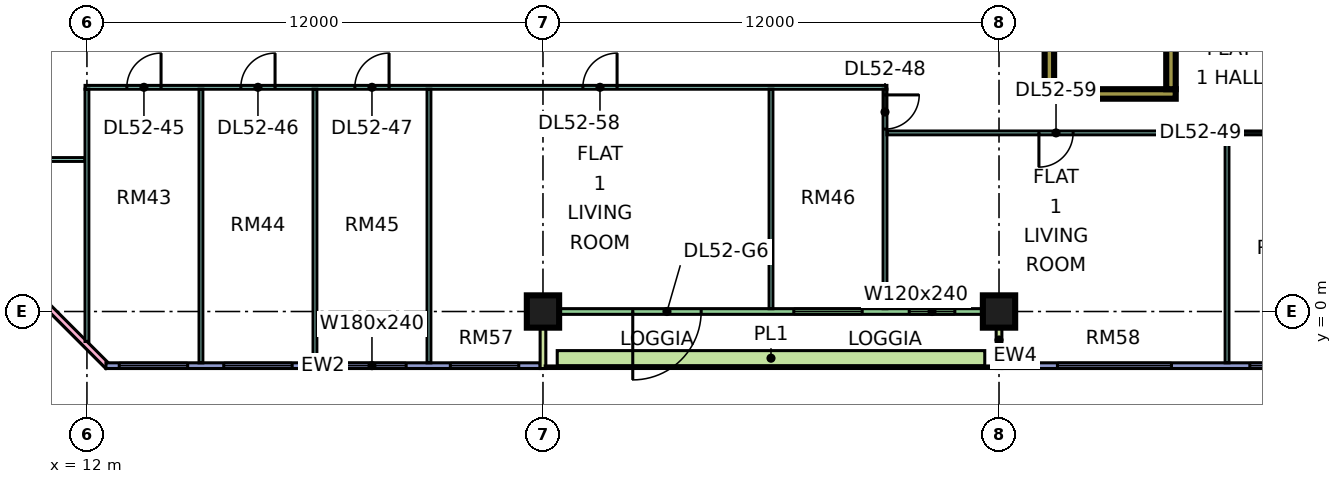
"""IFC4 building model, lengths in metres.
Left out: names, types, materials, properties, quantities, classifications, styles, units other than length and angle.
Written with IfcOpenShell. Run it as: python <this file> out.ifc"""

import sys

from ifc_helpers import new_model, si_unit, direction, frame, frame_2d, origin, origin_2d, place, context, subcontext, project, spatial, rectangle, extrude, element, fill, save


model = new_model("IFC4")
c1 = context("Model", 3, precision=1e-05, world=origin(), true_north=direction((0.0, 1.0)))
c2 = subcontext(c1, "Body", "Model", "MODEL_VIEW")
j1 = project(units=[si_unit("LENGTHUNIT", "METRE"), si_unit("PLANEANGLEUNIT", "RADIAN")], contexts=[c1])
p1 = place(None, origin())
s1 = spatial("IfcSite", under=j1, at=p1, CompositionType="ELEMENT")
p2 = place(p1, origin())
s2 = spatial("IfcBuilding", under=s1, at=p2, CompositionType="ELEMENT")
p3 = place(p2, frame((0.0, 0.0, 222.9)))
s3 = spatial("IfcBuildingStorey", under=s2, at=p3, CompositionType="ELEMENT", Elevation=222.9)
for number, where, z_axis, x_axis in (
    (1, (24.0, 0.0, 0.0), (0.0, 0.0, 1.0), (1.0, 0.0, 0.0)),
    (2, (36.0, 0.0, 0.0), (0.0, 0.0, 1.0), (1.0, 0.0, 0.0)),
):
    element("IfcColumn", number, at=place(p3, frame(where, z_axis=z_axis, x_axis=x_axis)), inside=s3, PredefinedType="COLUMN", context=c2, shape_type="SweptSolid", body=[
        extrude(rectangle(XDim=0.85, YDim=0.85, at=origin_2d()), origin(), (0.0, 0.0, 1.0), 3.75),
    ])
p4 = place(p3, frame((37.2, 5.725, 0.0), z_axis=(0.0, 0.0, 1.0), x_axis=(1.0, 0.0, 0.0)))
e3 = element("IfcWall", 3, at=p4, inside=s3, PredefinedType="SHEAR", context=c2, shape_type="SweptSolid", body=[
    extrude(rectangle(XDim=3.45, YDim=0.25, at=frame_2d((1.725, 0.0))), origin(), (0.0, 0.0, 1.0), 3.75),
])
for number, where, z_axis, x_axis in (
    (4, (37.325, 5.85, 0.0), (0.0, 0.0, 1.0), (0.0, 1.0, 0.0)),
    (5, (40.525, 5.85, 0.0), (0.0, 0.0, 1.0), (0.0, 1.0, 0.0)),
):
    element("IfcWall", number, at=place(p3, frame(where, z_axis=z_axis, x_axis=x_axis)), inside=s3, PredefinedType="SHEAR", context=c2, shape_type="SweptSolid", body=[
        extrude(rectangle(XDim=6.5, YDim=0.25, at=frame_2d((3.25, 0.0))), origin(), (0.0, 0.0, 1.0), 3.75),
    ])
p5 = place(p3, frame((-1.447, 12.553, 0.0), z_axis=(0.0, 0.0, 1.0), x_axis=(0.707106781187, -0.707106781187, 0.0)))
e6 = element("IfcWall", 6, at=p5, inside=s3, PredefinedType="SOLIDWALL", context=c2, shape_type="SweptSolid", body=[
    extrude(rectangle(XDim=19.799, YDim=0.15, at=frame_2d((9.899, 0.0))), origin(), (0.0, 0.0, 1.0), 3.35),
])
p6 = place(p5, frame((2.212, 0.0, 0.45)))
e7 = element("IfcOpeningElement", 7, at=p6, cuts=e6, PredefinedType="OPENING", context=c2, shape_type="SweptSolid", body=[
    extrude(rectangle(XDim=3.0, YDim=2.4, at=frame_2d((1.5, 1.2))), frame((0.0, 0.085, 0.0), z_axis=(0.0, -1.0, 0.0), x_axis=(1.0, 0.0, 0.0)), (0.0, 0.0, 1.0), 0.17),
])
p7 = place(p5, frame((10.216, 0.0, 0.45)))
e8 = element("IfcOpeningElement", 8, at=p7, cuts=e6, PredefinedType="OPENING", context=c2, shape_type="SweptSolid", body=[
    extrude(rectangle(XDim=3.0, YDim=2.4, at=frame_2d((1.5, 1.2))), frame((0.0, 0.085, 0.0), z_axis=(0.0, -1.0, 0.0), x_axis=(1.0, 0.0, 0.0)), (0.0, 0.0, 1.0), 0.17),
])
p8 = place(p3, frame((12.5, -1.425, 0.0), z_axis=(0.0, 0.0, 1.0), x_axis=(1.0, 0.0, 0.0)))
e9 = element("IfcWall", 9, at=p8, inside=s3, PredefinedType="SOLIDWALL", context=c2, shape_type="SweptSolid", body=[
    extrude(rectangle(XDim=11.425, YDim=0.15, at=frame_2d((5.712, 0.0))), origin(), (0.0, 0.0, 1.0), 3.35),
])
p9 = place(p8, frame((0.35, 0.0, 0.45)))
e10 = element("IfcOpeningElement", 10, at=p9, cuts=e9, PredefinedType="OPENING", context=c2, shape_type="SweptSolid", body=[
    extrude(rectangle(XDim=1.8, YDim=2.4, at=frame_2d((0.9, 1.2))), frame((0.0, 0.085, 0.0), z_axis=(0.0, -1.0, 0.0), x_axis=(1.0, 0.0, 0.0)), (0.0, 0.0, 1.0), 0.17),
])
p10 = place(p8, frame((3.1, 0.0, 0.45)))
e11 = element("IfcOpeningElement", 11, at=p10, cuts=e9, PredefinedType="OPENING", context=c2, shape_type="SweptSolid", body=[
    extrude(rectangle(XDim=1.8, YDim=2.4, at=frame_2d((0.9, 1.2))), frame((0.0, 0.085, 0.0), z_axis=(0.0, -1.0, 0.0), x_axis=(1.0, 0.0, 0.0)), (0.0, 0.0, 1.0), 0.17),
])
p11 = place(p8, frame((6.1, 0.0, 0.45)))
e12 = element("IfcOpeningElement", 12, at=p11, cuts=e9, PredefinedType="OPENING", context=c2, shape_type="SweptSolid", body=[
    extrude(rectangle(XDim=1.8, YDim=2.4, at=frame_2d((0.9, 1.2))), frame((0.0, 0.085, 0.0), z_axis=(0.0, -1.0, 0.0), x_axis=(1.0, 0.0, 0.0)), (0.0, 0.0, 1.0), 0.17),
])
p12 = place(p8, frame((9.062, 0.0, 0.45)))
e13 = element("IfcOpeningElement", 13, at=p12, cuts=e9, PredefinedType="OPENING", context=c2, shape_type="SweptSolid", body=[
    extrude(rectangle(XDim=1.8, YDim=2.4, at=frame_2d((0.9, 1.2))), frame((0.0, 0.085, 0.0), z_axis=(0.0, -1.0, 0.0), x_axis=(1.0, 0.0, 0.0)), (0.0, 0.0, 1.0), 0.17),
])
p13 = place(p3, frame((24.075, 0.0, 0.0), z_axis=(0.0, 0.0, 1.0), x_axis=(1.0, 0.0, 0.0)))
e14 = element("IfcWall", 14, at=p13, inside=s3, PredefinedType="SOLIDWALL", context=c2, shape_type="SweptSolid", body=[
    extrude(rectangle(XDim=11.85, YDim=0.15, at=frame_2d((5.925, 0.0))), origin(), (0.0, 0.0, 1.0), 3.35),
])
p14 = place(p13, frame((2.288, 0.0, 0.0)))
e15 = element("IfcOpeningElement", 15, at=p14, cuts=e14, PredefinedType="OPENING", context=c2, shape_type="SweptSolid", body=[
    extrude(rectangle(XDim=1.8, YDim=2.4, at=frame_2d((0.9, 1.2))), frame((0.0, 0.085, 0.0), z_axis=(0.0, -1.0, 0.0), x_axis=(1.0, 0.0, 0.0)), (0.0, 0.0, 1.0), 0.17),
])
p15 = place(p13, frame((6.525, 0.0, 0.45)))
e16 = element("IfcOpeningElement", 16, at=p15, cuts=e14, PredefinedType="OPENING", context=c2, shape_type="SweptSolid", body=[
    extrude(rectangle(XDim=1.8, YDim=2.4, at=frame_2d((0.9, 1.2))), frame((0.0, 0.085, 0.0), z_axis=(0.0, -1.0, 0.0), x_axis=(1.0, 0.0, 0.0)), (0.0, 0.0, 1.0), 0.17),
])
p16 = place(p13, frame((9.562, 0.0, 0.45)))
e17 = element("IfcOpeningElement", 17, at=p16, cuts=e14, PredefinedType="OPENING", context=c2, shape_type="SweptSolid", body=[
    extrude(rectangle(XDim=1.2, YDim=2.4, at=frame_2d((0.6, 1.2))), frame((0.0, 0.085, 0.0), z_axis=(0.0, -1.0, 0.0), x_axis=(1.0, 0.0, 0.0)), (0.0, 0.0, 1.0), 0.17),
])
for number, where, z_axis, x_axis in (
    (18, (24.0, -1.5, 0.0), (0.0, 0.0, 1.0), (0.0, 1.0, 0.0)),
    (19, (36.0, -1.5, 0.0), (0.0, 0.0, 1.0), (0.0, 1.0, 0.0)),
):
    element("IfcWall", number, at=place(p3, frame(where, z_axis=z_axis, x_axis=x_axis)), inside=s3, PredefinedType="SOLIDWALL", context=c2, shape_type="SweptSolid", body=[
        extrude(rectangle(XDim=1.5, YDim=0.15, at=frame_2d((0.75, 0.0))), origin(), (0.0, 0.0, 1.0), 3.35),
    ])
p17 = place(p3, frame((36.075, -1.425, 0.0), z_axis=(0.0, 0.0, 1.0), x_axis=(1.0, 0.0, 0.0)))
e20 = element("IfcWall", 20, at=p17, inside=s3, PredefinedType="SOLIDWALL", context=c2, shape_type="SweptSolid", body=[
    extrude(rectangle(XDim=11.85, YDim=0.15, at=frame_2d((5.925, 0.0))), origin(), (0.0, 0.0, 1.0), 3.35),
])
p18 = place(p17, frame((1.462, 0.0, 0.45)))
e21 = element("IfcOpeningElement", 21, at=p18, cuts=e20, PredefinedType="OPENING", context=c2, shape_type="SweptSolid", body=[
    extrude(rectangle(XDim=3.0, YDim=2.4, at=frame_2d((1.5, 1.2))), frame((0.0, 0.085, 0.0), z_axis=(0.0, -1.0, 0.0), x_axis=(1.0, 0.0, 0.0)), (0.0, 0.0, 1.0), 0.17),
])
p19 = place(p17, frame((6.525, 0.0, 0.45)))
e22 = element("IfcOpeningElement", 22, at=p19, cuts=e20, PredefinedType="OPENING", context=c2, shape_type="SweptSolid", body=[
    extrude(rectangle(XDim=1.8, YDim=2.4, at=frame_2d((0.9, 1.2))), frame((0.0, 0.085, 0.0), z_axis=(0.0, -1.0, 0.0), x_axis=(1.0, 0.0, 0.0)), (0.0, 0.0, 1.0), 0.17),
])
p20 = place(p17, frame((9.488, 0.0, 0.45)))
e23 = element("IfcOpeningElement", 23, at=p20, cuts=e20, PredefinedType="OPENING", context=c2, shape_type="SweptSolid", body=[
    extrude(rectangle(XDim=1.8, YDim=2.4, at=frame_2d((0.9, 1.2))), frame((0.0, 0.085, 0.0), z_axis=(0.0, -1.0, 0.0), x_axis=(1.0, 0.0, 0.0)), (0.0, 0.0, 1.0), 0.17),
])
p21 = place(p3, frame((24.375, -1.229, 0.0), z_axis=(0.0, 0.0, 1.0), x_axis=(1.0, 0.0, 0.0)))
e24 = element("IfcWall", 24, at=p21, inside=s3, PredefinedType="SOLIDWALL", context=c2, shape_type="SweptSolid", body=[
    extrude(rectangle(XDim=11.25, YDim=0.4, at=frame_2d((5.625, 0.0))), origin(), (0.0, 0.0, 1.0), 0.7),
])
p22 = place(p3, frame((9.05, 4.0, 0.0), z_axis=(0.0, 0.0, 1.0), x_axis=(1.0, 0.0, 0.0)))
e25 = element("IfcWall", 25, at=p22, inside=s3, PredefinedType="PARTITIONING", context=c2, shape_type="SweptSolid", body=[
    extrude(rectangle(XDim=2.9, YDim=0.1, at=frame_2d((1.45, 0.0))), origin(), (0.0, 0.0, 1.0), 3.35),
])
p23 = place(p3, frame((11.95, 5.9, 0.0), z_axis=(0.0, 0.0, 1.0), x_axis=(1.0, 0.0, 0.0)))
e26 = element("IfcWall", 26, at=p23, inside=s3, PredefinedType="PARTITIONING", context=c2, shape_type="SweptSolid", body=[
    extrude(rectangle(XDim=21.1, YDim=0.1, at=frame_2d((10.55, 0.0))), origin(), (0.0, 0.0, 1.0), 3.35),
])
p24 = place(p23, frame((1.1, 0.0, 0.0)))
e27 = element("IfcOpeningElement", 27, at=p24, cuts=e26, PredefinedType="OPENING", context=c2, shape_type="SweptSolid", body=[
    extrude(rectangle(XDim=0.9, YDim=2.1, at=frame_2d((0.45, 1.05))), frame((0.0, 0.06, 0.0), z_axis=(0.0, -1.0, 0.0), x_axis=(1.0, 0.0, 0.0)), (0.0, 0.0, 1.0), 0.12),
])
p25 = place(p23, frame((4.1, 0.0, 0.0)))
e28 = element("IfcOpeningElement", 28, at=p25, cuts=e26, PredefinedType="OPENING", context=c2, shape_type="SweptSolid", body=[
    extrude(rectangle(XDim=0.9, YDim=2.1, at=frame_2d((0.45, 1.05))), frame((0.0, 0.06, 0.0), z_axis=(0.0, -1.0, 0.0), x_axis=(1.0, 0.0, 0.0)), (0.0, 0.0, 1.0), 0.12),
])
p26 = place(p23, frame((7.1, 0.0, 0.0)))
e29 = element("IfcOpeningElement", 29, at=p26, cuts=e26, PredefinedType="OPENING", context=c2, shape_type="SweptSolid", body=[
    extrude(rectangle(XDim=0.9, YDim=2.1, at=frame_2d((0.45, 1.05))), frame((0.0, 0.06, 0.0), z_axis=(0.0, -1.0, 0.0), x_axis=(1.0, 0.0, 0.0)), (0.0, 0.0, 1.0), 0.12),
])
p27 = place(p23, frame((13.1, 0.0, 0.0)))
e30 = element("IfcOpeningElement", 30, at=p27, cuts=e26, PredefinedType="OPENING", context=c2, shape_type="SweptSolid", body=[
    extrude(rectangle(XDim=0.9, YDim=2.1, at=frame_2d((0.45, 1.05))), frame((0.0, 0.06, 0.0), z_axis=(0.0, -1.0, 0.0), x_axis=(1.0, 0.0, 0.0)), (0.0, 0.0, 1.0), 0.12),
])
p28 = place(p3, frame((12.0, -0.788, 0.0), z_axis=(0.0, 0.0, 1.0), x_axis=(0.0, 1.0, 0.0)))
e31 = element("IfcWall", 31, at=p28, inside=s3, PredefinedType="PARTITIONING", context=c2, shape_type="SweptSolid", body=[
    extrude(rectangle(XDim=6.638, YDim=0.1, at=frame_2d((3.319, 0.0))), origin(), (0.0, 0.0, 1.0), 3.35),
])
for number, where, z_axis, x_axis in (
    (32, (15.0, -1.351, 0.0), (0.0, 0.0, 1.0), (0.0, 1.0, 0.0)),
    (33, (18.0, -1.351, 0.0), (0.0, 0.0, 1.0), (0.0, 1.0, 0.0)),
):
    element("IfcWall", number, at=place(p3, frame(where, z_axis=z_axis, x_axis=x_axis)), inside=s3, PredefinedType="PARTITIONING", context=c2, shape_type="SweptSolid", body=[
        extrude(rectangle(XDim=7.201, YDim=0.1, at=frame_2d((3.601, 0.0))), origin(), (0.0, 0.0, 1.0), 3.35),
    ])
p29 = place(p3, frame((21.0, -1.35, 0.0), z_axis=(0.0, 0.0, 1.0), x_axis=(0.0, 1.0, 0.0)))
e34 = element("IfcWall", 34, at=p29, inside=s3, PredefinedType="PARTITIONING", context=c2, shape_type="SweptSolid", body=[
    extrude(rectangle(XDim=7.2, YDim=0.1, at=frame_2d((3.6, 0.0))), origin(), (0.0, 0.0, 1.0), 3.35),
])
p30 = place(p3, frame((30.0, 0.074, 0.0), z_axis=(0.0, 0.0, 1.0), x_axis=(0.0, 1.0, 0.0)))
e35 = element("IfcWall", 35, at=p30, inside=s3, PredefinedType="PARTITIONING", context=c2, shape_type="SweptSolid", body=[
    extrude(rectangle(XDim=5.776, YDim=0.1, at=frame_2d((2.888, 0.0))), origin(), (0.0, 0.0, 1.0), 3.35),
])
p31 = place(p3, frame((33.0, 0.074, 0.0), z_axis=(0.0, 0.0, 1.0), x_axis=(0.0, 1.0, 0.0)))
e36 = element("IfcWall", 36, at=p31, inside=s3, PredefinedType="PARTITIONING", context=c2, shape_type="SweptSolid", body=[
    extrude(rectangle(XDim=5.776, YDim=0.1, at=frame_2d((2.888, 0.0))), origin(), (0.0, 0.0, 1.0), 3.35),
])
p32 = place(p31, frame((4.726, 0.0, 0.0)))
e37 = element("IfcOpeningElement", 37, at=p32, cuts=e36, PredefinedType="OPENING", context=c2, shape_type="SweptSolid", body=[
    extrude(rectangle(XDim=0.9, YDim=2.1, at=frame_2d((0.45, 1.05))), frame((0.0, 0.06, 0.0), z_axis=(0.0, -1.0, 0.0), x_axis=(1.0, 0.0, 0.0)), (0.0, 0.0, 1.0), 0.12),
])
p33 = place(p3, frame((33.05, 4.7, 0.0), z_axis=(0.0, 0.0, 1.0), x_axis=(1.0, 0.0, 0.0)))
e38 = element("IfcWall", 38, at=p33, inside=s3, PredefinedType="PARTITIONING", context=c2, shape_type="SweptSolid", body=[
    extrude(rectangle(XDim=20.85, YDim=0.1, at=frame_2d((10.425, 0.0))), origin(), (0.0, 0.0, 1.0), 3.35),
])
p34 = place(p33, frame((10.0, 0.0, 0.0)))
e39 = element("IfcOpeningElement", 39, at=p34, cuts=e38, PredefinedType="OPENING", context=c2, shape_type="SweptSolid", body=[
    extrude(rectangle(XDim=0.9, YDim=2.1, at=frame_2d((0.45, 1.05))), frame((0.0, 0.06, 0.0), z_axis=(0.0, -1.0, 0.0), x_axis=(1.0, 0.0, 0.0)), (0.0, 0.0, 1.0), 0.12),
])
p35 = place(p33, frame((13.0, 0.0, 0.0)))
e40 = element("IfcOpeningElement", 40, at=p35, cuts=e38, PredefinedType="OPENING", context=c2, shape_type="SweptSolid", body=[
    extrude(rectangle(XDim=0.9, YDim=2.1, at=frame_2d((0.45, 1.05))), frame((0.0, 0.06, 0.0), z_axis=(0.0, -1.0, 0.0), x_axis=(1.0, 0.0, 0.0)), (0.0, 0.0, 1.0), 0.12),
])
p36 = place(p33, frame((16.0, 0.0, 0.0)))
e41 = element("IfcOpeningElement", 41, at=p36, cuts=e38, PredefinedType="OPENING", context=c2, shape_type="SweptSolid", body=[
    extrude(rectangle(XDim=0.9, YDim=2.1, at=frame_2d((0.45, 1.05))), frame((0.0, 0.06, 0.0), z_axis=(0.0, -1.0, 0.0), x_axis=(1.0, 0.0, 0.0)), (0.0, 0.0, 1.0), 0.12),
])
p37 = place(p33, frame((19.0, 0.0, 0.0)))
e42 = element("IfcOpeningElement", 42, at=p37, cuts=e38, PredefinedType="OPENING", context=c2, shape_type="SweptSolid", body=[
    extrude(rectangle(XDim=0.9, YDim=2.1, at=frame_2d((0.45, 1.05))), frame((0.0, 0.06, 0.0), z_axis=(0.0, -1.0, 0.0), x_axis=(1.0, 0.0, 0.0)), (0.0, 0.0, 1.0), 0.12),
])
p38 = place(p33, frame((4.0, 0.0, 0.0)))
e43 = element("IfcOpeningElement", 43, at=p38, cuts=e38, PredefinedType="OPENING", context=c2, shape_type="SweptSolid", body=[
    extrude(rectangle(XDim=0.9, YDim=2.1, at=frame_2d((0.45, 1.05))), frame((0.0, 0.06, 0.0), z_axis=(0.0, -1.0, 0.0), x_axis=(1.0, 0.0, 0.0)), (0.0, 0.0, 1.0), 0.12),
])
p39 = place(p3, frame((42.0, -1.35, 0.0), z_axis=(0.0, 0.0, 1.0), x_axis=(0.0, 1.0, 0.0)))
e44 = element("IfcWall", 44, at=p39, inside=s3, PredefinedType="PARTITIONING", context=c2, shape_type="SweptSolid", body=[
    extrude(rectangle(XDim=6.0, YDim=0.1, at=frame_2d((3.0, 0.0))), origin(), (0.0, 0.0, 1.0), 3.35),
])
p40 = place(p9, origin())
e45 = element("IfcWindow", 45, at=p40, inside=s3, PartitioningType="SINGLE_PANEL", PredefinedType="WINDOW", context=c2, shape_type="SweptSolid", body=[
    extrude(rectangle(XDim=1.8, YDim=2.4, at=frame_2d((0.9, 1.2))), frame((0.0, 0.03, 0.0), z_axis=(0.0, -1.0, 0.0), x_axis=(1.0, 0.0, 0.0)), (0.0, 0.0, 1.0), 0.06),
])
fill(e10, e45)
p41 = place(p10, origin())
e46 = element("IfcWindow", 46, at=p41, inside=s3, PartitioningType="SINGLE_PANEL", PredefinedType="WINDOW", context=c2, shape_type="SweptSolid", body=[
    extrude(rectangle(XDim=1.8, YDim=2.4, at=frame_2d((0.9, 1.2))), frame((0.0, 0.03, 0.0), z_axis=(0.0, -1.0, 0.0), x_axis=(1.0, 0.0, 0.0)), (0.0, 0.0, 1.0), 0.06),
])
fill(e11, e46)
p42 = place(p11, origin())
e47 = element("IfcWindow", 47, at=p42, inside=s3, PartitioningType="SINGLE_PANEL", PredefinedType="WINDOW", context=c2, shape_type="SweptSolid", body=[
    extrude(rectangle(XDim=1.8, YDim=2.4, at=frame_2d((0.9, 1.2))), frame((0.0, 0.03, 0.0), z_axis=(0.0, -1.0, 0.0), x_axis=(1.0, 0.0, 0.0)), (0.0, 0.0, 1.0), 0.06),
])
fill(e12, e47)
p43 = place(p12, origin())
e48 = element("IfcWindow", 48, at=p43, inside=s3, PartitioningType="SINGLE_PANEL", PredefinedType="WINDOW", context=c2, shape_type="SweptSolid", body=[
    extrude(rectangle(XDim=1.8, YDim=2.4, at=frame_2d((0.9, 1.2))), frame((0.0, 0.03, 0.0), z_axis=(0.0, -1.0, 0.0), x_axis=(1.0, 0.0, 0.0)), (0.0, 0.0, 1.0), 0.06),
])
fill(e13, e48)
p44 = place(p14, frame((1.8, 0.0, 0.0), z_axis=(0.0, 0.0, 1.0), x_axis=(-1.0, 0.0, 0.0)))
e49 = element("IfcDoor", 49, at=p44, inside=s3, OperationType="DOUBLE_DOOR_SINGLE_SWING", PredefinedType="DOOR", context=c2, shape_type="SweptSolid", body=[
    extrude(rectangle(XDim=1.8, YDim=2.4, at=frame_2d((0.9, 1.2))), frame((0.0, 0.025, 0.0), z_axis=(0.0, -1.0, 0.0), x_axis=(1.0, 0.0, 0.0)), (0.0, 0.0, 1.0), 0.05),
])
fill(e15, e49)
p45 = place(p15, origin())
e50 = element("IfcWindow", 50, at=p45, inside=s3, PartitioningType="SINGLE_PANEL", PredefinedType="WINDOW", context=c2, shape_type="SweptSolid", body=[
    extrude(rectangle(XDim=1.8, YDim=2.4, at=frame_2d((0.9, 1.2))), frame((0.0, 0.03, 0.0), z_axis=(0.0, -1.0, 0.0), x_axis=(1.0, 0.0, 0.0)), (0.0, 0.0, 1.0), 0.06),
])
fill(e16, e50)
p46 = place(p16, origin())
e51 = element("IfcWindow", 51, at=p46, inside=s3, PartitioningType="SINGLE_PANEL", PredefinedType="WINDOW", context=c2, shape_type="SweptSolid", body=[
    extrude(rectangle(XDim=1.2, YDim=2.4, at=frame_2d((0.6, 1.2))), frame((0.0, 0.03, 0.0), z_axis=(0.0, -1.0, 0.0), x_axis=(1.0, 0.0, 0.0)), (0.0, 0.0, 1.0), 0.06),
])
fill(e17, e51)
p47 = place(p18, origin())
e52 = element("IfcWindow", 52, at=p47, inside=s3, PartitioningType="SINGLE_PANEL", PredefinedType="WINDOW", context=c2, shape_type="SweptSolid", body=[
    extrude(rectangle(XDim=3.0, YDim=2.4, at=frame_2d((1.5, 1.2))), frame((0.0, 0.03, 0.0), z_axis=(0.0, -1.0, 0.0), x_axis=(1.0, 0.0, 0.0)), (0.0, 0.0, 1.0), 0.06),
])
fill(e21, e52)
p48 = place(p19, origin())
e53 = element("IfcWindow", 53, at=p48, inside=s3, PartitioningType="SINGLE_PANEL", PredefinedType="WINDOW", context=c2, shape_type="SweptSolid", body=[
    extrude(rectangle(XDim=1.8, YDim=2.4, at=frame_2d((0.9, 1.2))), frame((0.0, 0.03, 0.0), z_axis=(0.0, -1.0, 0.0), x_axis=(1.0, 0.0, 0.0)), (0.0, 0.0, 1.0), 0.06),
])
fill(e22, e53)
p49 = place(p24, frame((0.9, 0.0, 0.0), z_axis=(0.0, 0.0, 1.0), x_axis=(-1.0, 0.0, 0.0)))
e54 = element("IfcDoor", 54, at=p49, inside=s3, OperationType="SINGLE_SWING_RIGHT", PredefinedType="DOOR", context=c2, shape_type="SweptSolid", body=[
    extrude(rectangle(XDim=0.9, YDim=2.1, at=frame_2d((0.45, 1.05))), frame((0.0, 0.025, 0.0), z_axis=(0.0, -1.0, 0.0), x_axis=(1.0, 0.0, 0.0)), (0.0, 0.0, 1.0), 0.05),
])
fill(e27, e54)
p50 = place(p25, frame((0.9, 0.0, 0.0), z_axis=(0.0, 0.0, 1.0), x_axis=(-1.0, 0.0, 0.0)))
e55 = element("IfcDoor", 55, at=p50, inside=s3, OperationType="SINGLE_SWING_RIGHT", PredefinedType="DOOR", context=c2, shape_type="SweptSolid", body=[
    extrude(rectangle(XDim=0.9, YDim=2.1, at=frame_2d((0.45, 1.05))), frame((0.0, 0.025, 0.0), z_axis=(0.0, -1.0, 0.0), x_axis=(1.0, 0.0, 0.0)), (0.0, 0.0, 1.0), 0.05),
])
fill(e28, e55)
p51 = place(p26, frame((0.9, 0.0, 0.0), z_axis=(0.0, 0.0, 1.0), x_axis=(-1.0, 0.0, 0.0)))
e56 = element("IfcDoor", 56, at=p51, inside=s3, OperationType="SINGLE_SWING_RIGHT", PredefinedType="DOOR", context=c2, shape_type="SweptSolid", body=[
    extrude(rectangle(XDim=0.9, YDim=2.1, at=frame_2d((0.45, 1.05))), frame((0.0, 0.025, 0.0), z_axis=(0.0, -1.0, 0.0), x_axis=(1.0, 0.0, 0.0)), (0.0, 0.0, 1.0), 0.05),
])
fill(e29, e56)
p52 = place(p32, origin())
e57 = element("IfcDoor", 57, at=p52, inside=s3, OperationType="SINGLE_SWING_RIGHT", PredefinedType="DOOR", context=c2, shape_type="SweptSolid", body=[
    extrude(rectangle(XDim=0.9, YDim=2.1, at=frame_2d((0.45, 1.05))), frame((0.0, 0.025, 0.0), z_axis=(0.0, -1.0, 0.0), x_axis=(1.0, 0.0, 0.0)), (0.0, 0.0, 1.0), 0.05),
])
fill(e37, e57)
p53 = place(p27, frame((0.9, 0.0, 0.0), z_axis=(0.0, 0.0, 1.0), x_axis=(-1.0, 0.0, 0.0)))
e58 = element("IfcDoor", 58, at=p53, inside=s3, OperationType="SINGLE_SWING_RIGHT", PredefinedType="DOOR", context=c2, shape_type="SweptSolid", body=[
    extrude(rectangle(XDim=0.9, YDim=2.1, at=frame_2d((0.45, 1.05))), frame((0.0, 0.025, 0.0), z_axis=(0.0, -1.0, 0.0), x_axis=(1.0, 0.0, 0.0)), (0.0, 0.0, 1.0), 0.05),
])
fill(e30, e58)
p54 = place(p38, frame((0.9, 0.0, 0.0), z_axis=(0.0, 0.0, 1.0), x_axis=(-1.0, 0.0, 0.0)))
e59 = element("IfcDoor", 59, at=p54, inside=s3, OperationType="SINGLE_SWING_LEFT", PredefinedType="DOOR", context=c2, shape_type="SweptSolid", body=[
    extrude(rectangle(XDim=0.9, YDim=2.1, at=frame_2d((0.45, 1.05))), frame((0.0, 0.025, 0.0), z_axis=(0.0, -1.0, 0.0), x_axis=(1.0, 0.0, 0.0)), (0.0, 0.0, 1.0), 0.05),
])
fill(e43, e59)
save(model, sys.argv[1])
